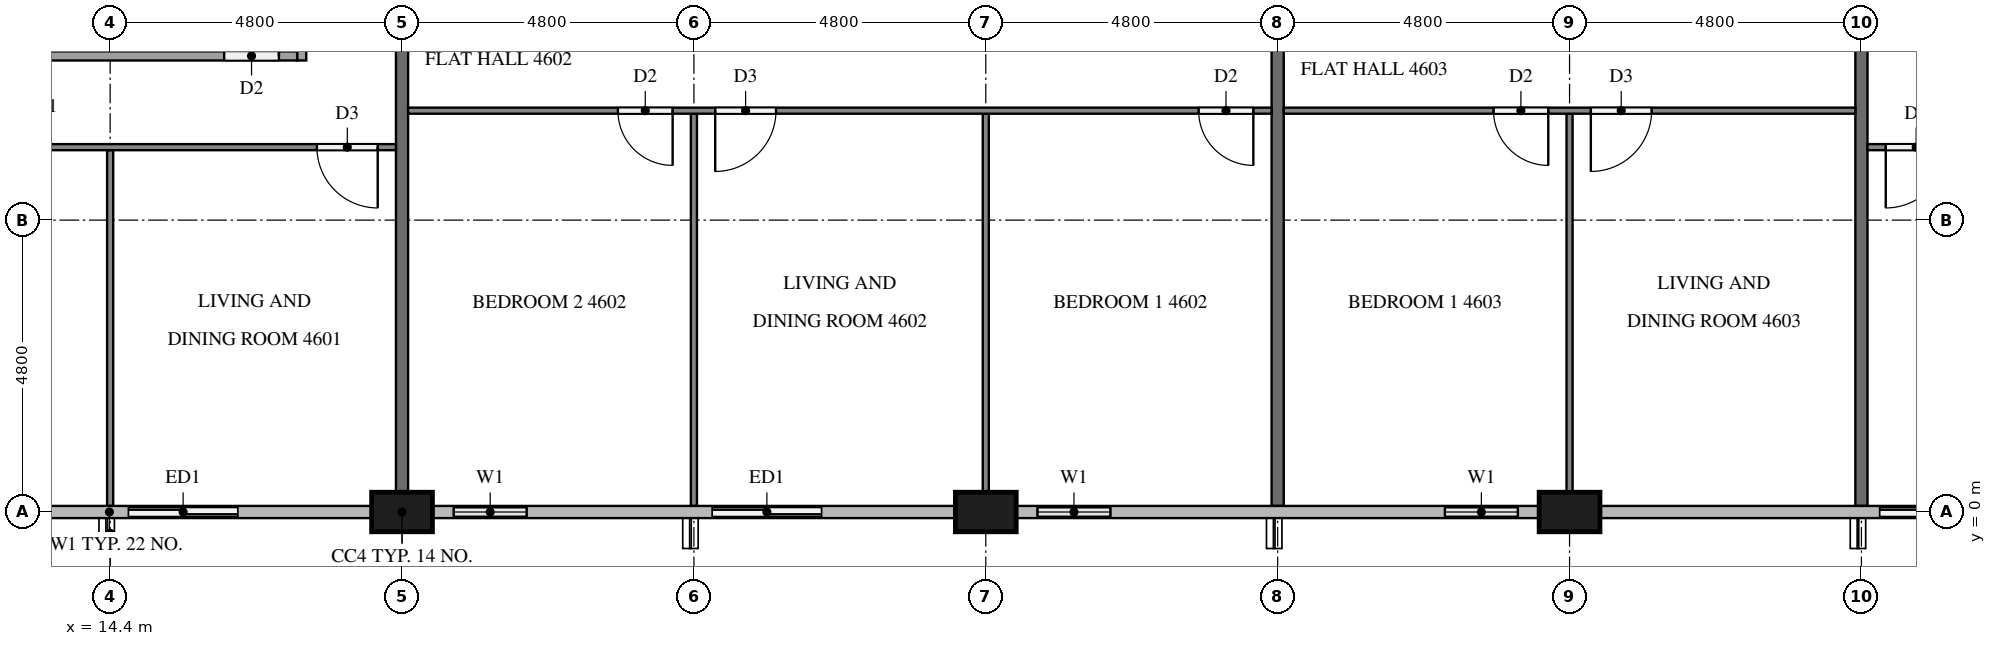
"""IFC4 building model, lengths in metres.
Left out: names, types, materials, properties, quantities, classifications, styles, units other than length and angle.
Written with IfcOpenShell. Run it as: python <this file> out.ifc"""

import sys

from ifc_helpers import new_model, si_unit, direction, frame, frame_2d, origin, origin_2d, place, context, subcontext, project, spatial, rectangle, extrude, element, fill, save


model = new_model("IFC4")
c1 = context("Model", 3, precision=1e-05, world=origin(), true_north=direction((0.0, 1.0)))
c2 = subcontext(c1, "Body", "Model", "MODEL_VIEW")
j1 = project(units=[si_unit("LENGTHUNIT", "METRE"), si_unit("PLANEANGLEUNIT", "RADIAN")], contexts=[c1])
p1 = place(None, origin())
s1 = spatial("IfcSite", under=j1, at=p1, CompositionType="ELEMENT")
p2 = place(p1, origin())
s2 = spatial("IfcBuilding", under=s1, at=p2, CompositionType="ELEMENT")
p3 = place(p2, frame((0.0, 0.0, 178.9)))
s3 = spatial("IfcBuildingStorey", under=s2, at=p3, CompositionType="ELEMENT", Elevation=178.9)
for number, where, z_axis, x_axis in (
    (1, (19.2, 0.0, 0.0), (0.0, 0.0, 1.0), (1.0, 0.0, 0.0)),
    (2, (28.8, 0.0, 0.0), (0.0, 0.0, 1.0), (1.0, 0.0, 0.0)),
    (3, (38.4, 0.0, 0.0), (0.0, 0.0, 1.0), (1.0, 0.0, 0.0)),
):
    element("IfcColumn", number, at=place(p3, frame(where, z_axis=z_axis, x_axis=x_axis)), inside=s3, PredefinedType="COLUMN", context=c2, shape_type="SweptSolid", body=[
        extrude(rectangle(XDim=1.0, YDim=0.65, at=origin_2d()), origin(), (0.0, 0.0, 1.0), 3.2),
    ])
p4 = place(p3, frame((14.4, 0.0, 0.0), z_axis=(0.0, 0.0, 1.0), x_axis=(1.0, 0.0, 0.0)))
e4 = element("IfcWall", 4, at=p4, inside=s3, PredefinedType="SOLIDWALL", context=c2, shape_type="SweptSolid", body=[
    extrude(rectangle(XDim=2.4, YDim=0.15, at=frame_2d((1.2, 0.0))), origin(), (0.0, 0.0, 1.0), 3.2),
])
p5 = place(p4, frame((0.3, 0.0, 0.0)))
e5 = element("IfcOpeningElement", 5, at=p5, cuts=e4, PredefinedType="OPENING", context=c2, shape_type="SweptSolid", body=[
    extrude(rectangle(XDim=1.8, YDim=2.4, at=frame_2d((0.9, 1.2))), frame((0.0, 0.085, 0.0), z_axis=(0.0, -1.0, 0.0), x_axis=(1.0, 0.0, 0.0)), (0.0, 0.0, 1.0), 0.17),
])
p6 = place(p3, frame((19.7, 0.0, 0.0), z_axis=(0.0, 0.0, 1.0), x_axis=(1.0, 0.0, 0.0)))
e6 = element("IfcWall", 6, at=p6, inside=s3, PredefinedType="SOLIDWALL", context=c2, shape_type="SweptSolid", body=[
    extrude(rectangle(XDim=1.9, YDim=0.15, at=frame_2d((0.95, 0.0))), origin(), (0.0, 0.0, 1.0), 3.2),
])
p7 = place(p6, frame((0.35, 0.0, 0.9)))
e7 = element("IfcOpeningElement", 7, at=p7, cuts=e6, PredefinedType="OPENING", context=c2, shape_type="SweptSolid", body=[
    extrude(rectangle(XDim=1.2, YDim=1.4, at=frame_2d((0.6, 0.7))), frame((0.0, 0.085, 0.0), z_axis=(0.0, -1.0, 0.0), x_axis=(1.0, 0.0, 0.0)), (0.0, 0.0, 1.0), 0.17),
])
p8 = place(p3, frame((24.0, 0.0, 0.0), z_axis=(0.0, 0.0, 1.0), x_axis=(1.0, 0.0, 0.0)))
e8 = element("IfcWall", 8, at=p8, inside=s3, PredefinedType="SOLIDWALL", context=c2, shape_type="SweptSolid", body=[
    extrude(rectangle(XDim=2.4, YDim=0.15, at=frame_2d((1.2, 0.0))), origin(), (0.0, 0.0, 1.0), 3.2),
])
p9 = place(p8, frame((0.3, 0.0, 0.0)))
e9 = element("IfcOpeningElement", 9, at=p9, cuts=e8, PredefinedType="OPENING", context=c2, shape_type="SweptSolid", body=[
    extrude(rectangle(XDim=1.8, YDim=2.4, at=frame_2d((0.9, 1.2))), frame((0.0, 0.085, 0.0), z_axis=(0.0, -1.0, 0.0), x_axis=(1.0, 0.0, 0.0)), (0.0, 0.0, 1.0), 0.17),
])
p10 = place(p3, frame((29.3, 0.0, 0.0), z_axis=(0.0, 0.0, 1.0), x_axis=(1.0, 0.0, 0.0)))
e10 = element("IfcWall", 10, at=p10, inside=s3, PredefinedType="SOLIDWALL", context=c2, shape_type="SweptSolid", body=[
    extrude(rectangle(XDim=1.9, YDim=0.15, at=frame_2d((0.95, 0.0))), origin(), (0.0, 0.0, 1.0), 3.2),
])
p11 = place(p10, frame((0.35, 0.0, 0.9)))
e11 = element("IfcOpeningElement", 11, at=p11, cuts=e10, PredefinedType="OPENING", context=c2, shape_type="SweptSolid", body=[
    extrude(rectangle(XDim=1.2, YDim=1.4, at=frame_2d((0.6, 0.7))), frame((0.0, 0.085, 0.0), z_axis=(0.0, -1.0, 0.0), x_axis=(1.0, 0.0, 0.0)), (0.0, 0.0, 1.0), 0.17),
])
p12 = place(p3, frame((36.0, 0.0, 0.0), z_axis=(0.0, 0.0, 1.0), x_axis=(1.0, 0.0, 0.0)))
e12 = element("IfcWall", 12, at=p12, inside=s3, PredefinedType="SOLIDWALL", context=c2, shape_type="SweptSolid", body=[
    extrude(rectangle(XDim=1.9, YDim=0.15, at=frame_2d((0.95, 0.0))), origin(), (0.0, 0.0, 1.0), 3.2),
])
p13 = place(p12, frame((0.35, 0.0, 0.9)))
e13 = element("IfcOpeningElement", 13, at=p13, cuts=e12, PredefinedType="OPENING", context=c2, shape_type="SweptSolid", body=[
    extrude(rectangle(XDim=1.2, YDim=1.4, at=frame_2d((0.6, 0.7))), frame((0.0, 0.085, 0.0), z_axis=(0.0, -1.0, 0.0), x_axis=(1.0, 0.0, 0.0)), (0.0, 0.0, 1.0), 0.17),
])
p14 = place(p3, frame((43.2, 0.0, 0.0), z_axis=(0.0, 0.0, 1.0), x_axis=(1.0, 0.0, 0.0)))
e14 = element("IfcWall", 14, at=p14, inside=s3, PredefinedType="SOLIDWALL", context=c2, shape_type="SweptSolid", body=[
    extrude(rectangle(XDim=2.4, YDim=0.15, at=frame_2d((1.2, 0.0))), origin(), (0.0, 0.0, 1.0), 3.2),
])
p15 = place(p14, frame((0.3, 0.0, 0.0)))
e15 = element("IfcOpeningElement", 15, at=p15, cuts=e14, PredefinedType="OPENING", context=c2, shape_type="SweptSolid", body=[
    extrude(rectangle(XDim=1.8, YDim=2.4, at=frame_2d((0.9, 1.2))), frame((0.0, 0.085, 0.0), z_axis=(0.0, -1.0, 0.0), x_axis=(1.0, 0.0, 0.0)), (0.0, 0.0, 1.0), 0.17),
])
p16 = place(p3, frame((19.2, 11.9, 0.0), z_axis=(0.0, 0.0, 1.0), x_axis=(0.0, -1.0, 0.0)))
e16 = element("IfcWall", 16, at=p16, inside=s3, PredefinedType="PARTITIONING", context=c2, shape_type="SweptSolid", body=[
    extrude(rectangle(XDim=11.575, YDim=0.2, at=frame_2d((5.788, 0.0))), origin(), (0.0, 0.0, 1.0), 3.2),
])
for number, where, z_axis, x_axis in (
    (17, (33.6, 11.9, 0.0), (0.0, 0.0, 1.0), (0.0, -1.0, 0.0)),
    (18, (43.2, 11.9, 0.0), (0.0, 0.0, 1.0), (0.0, -1.0, 0.0)),
):
    element("IfcWall", number, at=place(p3, frame(where, z_axis=z_axis, x_axis=x_axis)), inside=s3, PredefinedType="PARTITIONING", context=c2, shape_type="SweptSolid", body=[
        extrude(rectangle(XDim=11.8, YDim=0.2, at=frame_2d((5.9, 0.0))), origin(), (0.0, 0.0, 1.0), 3.2),
    ])
p17 = place(p3, frame((14.4, 5.95, 0.0), z_axis=(0.0, 0.0, 1.0), x_axis=(0.0, -1.0, 0.0)))
e19 = element("IfcWall", 19, at=p17, inside=s3, PredefinedType="PARTITIONING", context=c2, shape_type="SweptSolid", body=[
    extrude(rectangle(XDim=5.85, YDim=0.1, at=frame_2d((2.925, 0.0))), origin(), (0.0, 0.0, 1.0), 3.2),
])
p18 = place(p3, frame((19.1, 6.0, 0.0), z_axis=(0.0, 0.0, 1.0), x_axis=(-1.0, 0.0, 0.0)))
e20 = element("IfcWall", 20, at=p18, inside=s3, PredefinedType="PARTITIONING", context=c2, shape_type="SweptSolid", body=[
    extrude(rectangle(XDim=14.2, YDim=0.1, at=frame_2d((7.1, 0.0))), origin(), (0.0, 0.0, 1.0), 3.2),
])
p19 = place(p18, frame((0.3, 0.0, 0.0)))
e21 = element("IfcOpeningElement", 21, at=p19, cuts=e20, PredefinedType="OPENING", context=c2, shape_type="SweptSolid", body=[
    extrude(rectangle(XDim=1.0, YDim=2.1, at=frame_2d((0.5, 1.05))), frame((0.0, 0.06, 0.0), z_axis=(0.0, -1.0, 0.0), x_axis=(1.0, 0.0, 0.0)), (0.0, 0.0, 1.0), 0.12),
])
p20 = place(p18, frame((8.25, 0.0, 0.0)))
e22 = element("IfcOpeningElement", 22, at=p20, cuts=e20, PredefinedType="OPENING", context=c2, shape_type="SweptSolid", body=[
    extrude(rectangle(XDim=0.9, YDim=2.1, at=frame_2d((0.45, 1.05))), frame((0.0, 0.06, 0.0), z_axis=(0.0, -1.0, 0.0), x_axis=(1.0, 0.0, 0.0)), (0.0, 0.0, 1.0), 0.12),
])
p21 = place(p18, frame((9.85, 0.0, 0.0)))
e23 = element("IfcOpeningElement", 23, at=p21, cuts=e20, PredefinedType="OPENING", context=c2, shape_type="SweptSolid", body=[
    extrude(rectangle(XDim=0.9, YDim=2.1, at=frame_2d((0.45, 1.05))), frame((0.0, 0.06, 0.0), z_axis=(0.0, -1.0, 0.0), x_axis=(1.0, 0.0, 0.0)), (0.0, 0.0, 1.0), 0.12),
])
p22 = place(p3, frame((17.55, 11.9, 0.0), z_axis=(0.0, 0.0, 1.0), x_axis=(0.0, -1.0, 0.0)))
e24 = element("IfcWall", 24, at=p22, inside=s3, PredefinedType="PARTITIONING", context=c2, shape_type="SweptSolid", body=[
    extrude(rectangle(XDim=4.475, YDim=0.15, at=frame_2d((2.237, 0.0))), origin(), (0.0, 0.0, 1.0), 3.2),
])
p23 = place(p3, frame((4.9, 7.5, 0.0), z_axis=(0.0, 0.0, 1.0), x_axis=(1.0, 0.0, 0.0)))
e25 = element("IfcWall", 25, at=p23, inside=s3, PredefinedType="PARTITIONING", context=c2, shape_type="SweptSolid", body=[
    extrude(rectangle(XDim=12.575, YDim=0.15, at=frame_2d((6.288, 0.0))), origin(), (0.0, 0.0, 1.0), 3.2),
])
p24 = place(p23, frame((11.375, 0.0, 0.0)))
e26 = element("IfcOpeningElement", 26, at=p24, cuts=e25, PredefinedType="OPENING", context=c2, shape_type="SweptSolid", body=[
    extrude(rectangle(XDim=0.9, YDim=2.1, at=frame_2d((0.45, 1.05))), frame((0.0, 0.085, 0.0), z_axis=(0.0, -1.0, 0.0), x_axis=(1.0, 0.0, 0.0)), (0.0, 0.0, 1.0), 0.17),
])
p25 = place(p23, frame((4.194, 0.0, 0.0)))
e27 = element("IfcOpeningElement", 27, at=p25, cuts=e25, PredefinedType="OPENING", context=c2, shape_type="SweptSolid", body=[
    extrude(rectangle(XDim=0.8, YDim=2.1, at=frame_2d((0.4, 1.05))), frame((0.0, 0.085, 0.0), z_axis=(0.0, -1.0, 0.0), x_axis=(1.0, 0.0, 0.0)), (0.0, 0.0, 1.0), 0.17),
])
p26 = place(p23, frame((2.644, 0.0, 0.0)))
e28 = element("IfcOpeningElement", 28, at=p26, cuts=e25, PredefinedType="OPENING", context=c2, shape_type="SweptSolid", body=[
    extrude(rectangle(XDim=0.9, YDim=2.1, at=frame_2d((0.45, 1.05))), frame((0.0, 0.085, 0.0), z_axis=(0.0, -1.0, 0.0), x_axis=(1.0, 0.0, 0.0)), (0.0, 0.0, 1.0), 0.17),
])
p27 = place(p3, frame((28.8, 6.55, 0.0), z_axis=(0.0, 0.0, 1.0), x_axis=(0.0, -1.0, 0.0)))
e29 = element("IfcWall", 29, at=p27, inside=s3, PredefinedType="PARTITIONING", context=c2, shape_type="SweptSolid", body=[
    extrude(rectangle(XDim=6.225, YDim=0.1, at=frame_2d((3.113, 0.0))), origin(), (0.0, 0.0, 1.0), 3.2),
])
p28 = place(p3, frame((24.0, 6.55, 0.0), z_axis=(0.0, 0.0, 1.0), x_axis=(0.0, -1.0, 0.0)))
e30 = element("IfcWall", 30, at=p28, inside=s3, PredefinedType="PARTITIONING", context=c2, shape_type="SweptSolid", body=[
    extrude(rectangle(XDim=6.45, YDim=0.1, at=frame_2d((3.225, 0.0))), origin(), (0.0, 0.0, 1.0), 3.2),
])
p29 = place(p3, frame((33.5, 6.6, 0.0), z_axis=(0.0, 0.0, 1.0), x_axis=(-1.0, 0.0, 0.0)))
e31 = element("IfcWall", 31, at=p29, inside=s3, PredefinedType="PARTITIONING", context=c2, shape_type="SweptSolid", body=[
    extrude(rectangle(XDim=14.2, YDim=0.1, at=frame_2d((7.1, 0.0))), origin(), (0.0, 0.0, 1.0), 3.2),
])
p30 = place(p29, frame((0.3, 0.0, 0.0)))
e32 = element("IfcOpeningElement", 32, at=p30, cuts=e31, PredefinedType="OPENING", context=c2, shape_type="SweptSolid", body=[
    extrude(rectangle(XDim=0.9, YDim=2.1, at=frame_2d((0.45, 1.05))), frame((0.0, 0.06, 0.0), z_axis=(0.0, -1.0, 0.0), x_axis=(1.0, 0.0, 0.0)), (0.0, 0.0, 1.0), 0.12),
])
p31 = place(p29, frame((8.15, 0.0, 0.0)))
e33 = element("IfcOpeningElement", 33, at=p31, cuts=e31, PredefinedType="OPENING", context=c2, shape_type="SweptSolid", body=[
    extrude(rectangle(XDim=1.0, YDim=2.1, at=frame_2d((0.5, 1.05))), frame((0.0, 0.06, 0.0), z_axis=(0.0, -1.0, 0.0), x_axis=(1.0, 0.0, 0.0)), (0.0, 0.0, 1.0), 0.12),
])
p32 = place(p29, frame((9.85, 0.0, 0.0)))
e34 = element("IfcOpeningElement", 34, at=p32, cuts=e31, PredefinedType="OPENING", context=c2, shape_type="SweptSolid", body=[
    extrude(rectangle(XDim=0.9, YDim=2.1, at=frame_2d((0.45, 1.05))), frame((0.0, 0.06, 0.0), z_axis=(0.0, -1.0, 0.0), x_axis=(1.0, 0.0, 0.0)), (0.0, 0.0, 1.0), 0.12),
])
p33 = place(p3, frame((38.4, 6.55, 0.0), z_axis=(0.0, 0.0, 1.0), x_axis=(0.0, -1.0, 0.0)))
e35 = element("IfcWall", 35, at=p33, inside=s3, PredefinedType="PARTITIONING", context=c2, shape_type="SweptSolid", body=[
    extrude(rectangle(XDim=6.225, YDim=0.1, at=frame_2d((3.113, 0.0))), origin(), (0.0, 0.0, 1.0), 3.2),
])
p34 = place(p3, frame((43.1, 6.6, 0.0), z_axis=(0.0, 0.0, 1.0), x_axis=(-1.0, 0.0, 0.0)))
e36 = element("IfcWall", 36, at=p34, inside=s3, PredefinedType="PARTITIONING", context=c2, shape_type="SweptSolid", body=[
    extrude(rectangle(XDim=9.4, YDim=0.1, at=frame_2d((4.7, 0.0))), origin(), (0.0, 0.0, 1.0), 3.2),
])
p35 = place(p34, frame((3.35, 0.0, 0.0)))
e37 = element("IfcOpeningElement", 37, at=p35, cuts=e36, PredefinedType="OPENING", context=c2, shape_type="SweptSolid", body=[
    extrude(rectangle(XDim=1.0, YDim=2.1, at=frame_2d((0.5, 1.05))), frame((0.0, 0.06, 0.0), z_axis=(0.0, -1.0, 0.0), x_axis=(1.0, 0.0, 0.0)), (0.0, 0.0, 1.0), 0.12),
])
p36 = place(p34, frame((5.05, 0.0, 0.0)))
e38 = element("IfcOpeningElement", 38, at=p36, cuts=e36, PredefinedType="OPENING", context=c2, shape_type="SweptSolid", body=[
    extrude(rectangle(XDim=0.9, YDim=2.1, at=frame_2d((0.45, 1.05))), frame((0.0, 0.06, 0.0), z_axis=(0.0, -1.0, 0.0), x_axis=(1.0, 0.0, 0.0)), (0.0, 0.0, 1.0), 0.12),
])
p37 = place(p3, frame((62.3, 6.0, 0.0), z_axis=(0.0, 0.0, 1.0), x_axis=(-1.0, 0.0, 0.0)))
e39 = element("IfcWall", 39, at=p37, inside=s3, PredefinedType="PARTITIONING", context=c2, shape_type="SweptSolid", body=[
    extrude(rectangle(XDim=19.0, YDim=0.1, at=frame_2d((9.5, 0.0))), origin(), (0.0, 0.0, 1.0), 3.2),
])
p38 = place(p37, frame((17.7, 0.0, 0.0)))
e40 = element("IfcOpeningElement", 40, at=p38, cuts=e39, PredefinedType="OPENING", context=c2, shape_type="SweptSolid", body=[
    extrude(rectangle(XDim=1.0, YDim=2.1, at=frame_2d((0.5, 1.05))), frame((0.0, 0.06, 0.0), z_axis=(0.0, -1.0, 0.0), x_axis=(1.0, 0.0, 0.0)), (0.0, 0.0, 1.0), 0.12),
])
p39 = place(p37, frame((9.85, 0.0, 0.0)))
e41 = element("IfcOpeningElement", 41, at=p39, cuts=e39, PredefinedType="OPENING", context=c2, shape_type="SweptSolid", body=[
    extrude(rectangle(XDim=0.9, YDim=2.1, at=frame_2d((0.45, 1.05))), frame((0.0, 0.06, 0.0), z_axis=(0.0, -1.0, 0.0), x_axis=(1.0, 0.0, 0.0)), (0.0, 0.0, 1.0), 0.12),
])
p40 = place(p37, frame((8.25, 0.0, 0.0)))
e42 = element("IfcOpeningElement", 42, at=p40, cuts=e39, PredefinedType="OPENING", context=c2, shape_type="SweptSolid", body=[
    extrude(rectangle(XDim=0.9, YDim=2.1, at=frame_2d((0.45, 1.05))), frame((0.0, 0.06, 0.0), z_axis=(0.0, -1.0, 0.0), x_axis=(1.0, 0.0, 0.0)), (0.0, 0.0, 1.0), 0.12),
])
p41 = place(p37, frame((0.4, 0.0, 0.0)))
e43 = element("IfcOpeningElement", 43, at=p41, cuts=e39, PredefinedType="OPENING", context=c2, shape_type="SweptSolid", body=[
    extrude(rectangle(XDim=0.9, YDim=2.1, at=frame_2d((0.45, 1.05))), frame((0.0, 0.06, 0.0), z_axis=(0.0, -1.0, 0.0), x_axis=(1.0, 0.0, 0.0)), (0.0, 0.0, 1.0), 0.12),
])
p42 = place(p5, origin())
e44 = element("IfcDoor", 44, at=p42, inside=s3, OperationType="SLIDING_TO_LEFT", PredefinedType="DOOR", context=c2, shape_type="SweptSolid", body=[
    extrude(rectangle(XDim=1.8, YDim=2.4, at=frame_2d((0.9, 1.2))), frame((0.0, 0.025, 0.0), z_axis=(0.0, -1.0, 0.0), x_axis=(1.0, 0.0, 0.0)), (0.0, 0.0, 1.0), 0.05),
])
fill(e5, e44)
p43 = place(p7, origin())
e45 = element("IfcWindow", 45, at=p43, inside=s3, PartitioningType="SINGLE_PANEL", PredefinedType="WINDOW", context=c2, shape_type="SweptSolid", body=[
    extrude(rectangle(XDim=1.2, YDim=1.4, at=frame_2d((0.6, 0.7))), frame((0.0, 0.03, 0.0), z_axis=(0.0, -1.0, 0.0), x_axis=(1.0, 0.0, 0.0)), (0.0, 0.0, 1.0), 0.06),
])
fill(e7, e45)
p44 = place(p9, origin())
e46 = element("IfcDoor", 46, at=p44, inside=s3, OperationType="SLIDING_TO_RIGHT", PredefinedType="DOOR", context=c2, shape_type="SweptSolid", body=[
    extrude(rectangle(XDim=1.8, YDim=2.4, at=frame_2d((0.9, 1.2))), frame((0.0, 0.025, 0.0), z_axis=(0.0, -1.0, 0.0), x_axis=(1.0, 0.0, 0.0)), (0.0, 0.0, 1.0), 0.05),
])
fill(e9, e46)
p45 = place(p11, origin())
e47 = element("IfcWindow", 47, at=p45, inside=s3, PartitioningType="SINGLE_PANEL", PredefinedType="WINDOW", context=c2, shape_type="SweptSolid", body=[
    extrude(rectangle(XDim=1.2, YDim=1.4, at=frame_2d((0.6, 0.7))), frame((0.0, 0.03, 0.0), z_axis=(0.0, -1.0, 0.0), x_axis=(1.0, 0.0, 0.0)), (0.0, 0.0, 1.0), 0.06),
])
fill(e11, e47)
p46 = place(p13, origin())
e48 = element("IfcWindow", 48, at=p46, inside=s3, PartitioningType="SINGLE_PANEL", PredefinedType="WINDOW", context=c2, shape_type="SweptSolid", body=[
    extrude(rectangle(XDim=1.2, YDim=1.4, at=frame_2d((0.6, 0.7))), frame((0.0, 0.03, 0.0), z_axis=(0.0, -1.0, 0.0), x_axis=(1.0, 0.0, 0.0)), (0.0, 0.0, 1.0), 0.06),
])
fill(e13, e48)
p47 = place(p15, origin())
e49 = element("IfcDoor", 49, at=p47, inside=s3, OperationType="SLIDING_TO_LEFT", PredefinedType="DOOR", context=c2, shape_type="SweptSolid", body=[
    extrude(rectangle(XDim=1.8, YDim=2.4, at=frame_2d((0.9, 1.2))), frame((0.0, 0.025, 0.0), z_axis=(0.0, -1.0, 0.0), x_axis=(1.0, 0.0, 0.0)), (0.0, 0.0, 1.0), 0.05),
])
fill(e15, e49)
p48 = place(p19, origin())
e50 = element("IfcDoor", 50, at=p48, inside=s3, OperationType="SINGLE_SWING_LEFT", PredefinedType="DOOR", context=c2, shape_type="SweptSolid", body=[
    extrude(rectangle(XDim=1.0, YDim=2.1, at=frame_2d((0.5, 1.05))), frame((0.0, 0.025, 0.0), z_axis=(0.0, -1.0, 0.0), x_axis=(1.0, 0.0, 0.0)), (0.0, 0.0, 1.0), 0.05),
])
fill(e21, e50)
p49 = place(p24, origin())
e51 = element("IfcDoor", 51, at=p49, inside=s3, OperationType="SINGLE_SWING_RIGHT", PredefinedType="DOOR", context=c2, shape_type="SweptSolid", body=[
    extrude(rectangle(XDim=0.9, YDim=2.1, at=frame_2d((0.45, 1.05))), frame((0.0, 0.025, 0.0), z_axis=(0.0, -1.0, 0.0), x_axis=(1.0, 0.0, 0.0)), (0.0, 0.0, 1.0), 0.05),
])
fill(e26, e51)
p50 = place(p30, origin())
e52 = element("IfcDoor", 52, at=p50, inside=s3, OperationType="SINGLE_SWING_LEFT", PredefinedType="DOOR", context=c2, shape_type="SweptSolid", body=[
    extrude(rectangle(XDim=0.9, YDim=2.1, at=frame_2d((0.45, 1.05))), frame((0.0, 0.025, 0.0), z_axis=(0.0, -1.0, 0.0), x_axis=(1.0, 0.0, 0.0)), (0.0, 0.0, 1.0), 0.05),
])
fill(e32, e52)
p51 = place(p31, origin())
e53 = element("IfcDoor", 53, at=p51, inside=s3, OperationType="SINGLE_SWING_RIGHT", PredefinedType="DOOR", context=c2, shape_type="SweptSolid", body=[
    extrude(rectangle(XDim=1.0, YDim=2.1, at=frame_2d((0.5, 1.05))), frame((0.0, 0.025, 0.0), z_axis=(0.0, -1.0, 0.0), x_axis=(1.0, 0.0, 0.0)), (0.0, 0.0, 1.0), 0.05),
])
fill(e33, e53)
p52 = place(p32, origin())
e54 = element("IfcDoor", 54, at=p52, inside=s3, OperationType="SINGLE_SWING_LEFT", PredefinedType="DOOR", context=c2, shape_type="SweptSolid", body=[
    extrude(rectangle(XDim=0.9, YDim=2.1, at=frame_2d((0.45, 1.05))), frame((0.0, 0.025, 0.0), z_axis=(0.0, -1.0, 0.0), x_axis=(1.0, 0.0, 0.0)), (0.0, 0.0, 1.0), 0.05),
])
fill(e34, e54)
p53 = place(p35, origin())
e55 = element("IfcDoor", 55, at=p53, inside=s3, OperationType="SINGLE_SWING_RIGHT", PredefinedType="DOOR", context=c2, shape_type="SweptSolid", body=[
    extrude(rectangle(XDim=1.0, YDim=2.1, at=frame_2d((0.5, 1.05))), frame((0.0, 0.025, 0.0), z_axis=(0.0, -1.0, 0.0), x_axis=(1.0, 0.0, 0.0)), (0.0, 0.0, 1.0), 0.05),
])
fill(e37, e55)
p54 = place(p36, origin())
e56 = element("IfcDoor", 56, at=p54, inside=s3, OperationType="SINGLE_SWING_LEFT", PredefinedType="DOOR", context=c2, shape_type="SweptSolid", body=[
    extrude(rectangle(XDim=0.9, YDim=2.1, at=frame_2d((0.45, 1.05))), frame((0.0, 0.025, 0.0), z_axis=(0.0, -1.0, 0.0), x_axis=(1.0, 0.0, 0.0)), (0.0, 0.0, 1.0), 0.05),
])
fill(e38, e56)
p55 = place(p38, origin())
e57 = element("IfcDoor", 57, at=p55, inside=s3, OperationType="SINGLE_SWING_RIGHT", PredefinedType="DOOR", context=c2, shape_type="SweptSolid", body=[
    extrude(rectangle(XDim=1.0, YDim=2.1, at=frame_2d((0.5, 1.05))), frame((0.0, 0.025, 0.0), z_axis=(0.0, -1.0, 0.0), x_axis=(1.0, 0.0, 0.0)), (0.0, 0.0, 1.0), 0.05),
])
fill(e40, e57)
save(model, sys.argv[1])
